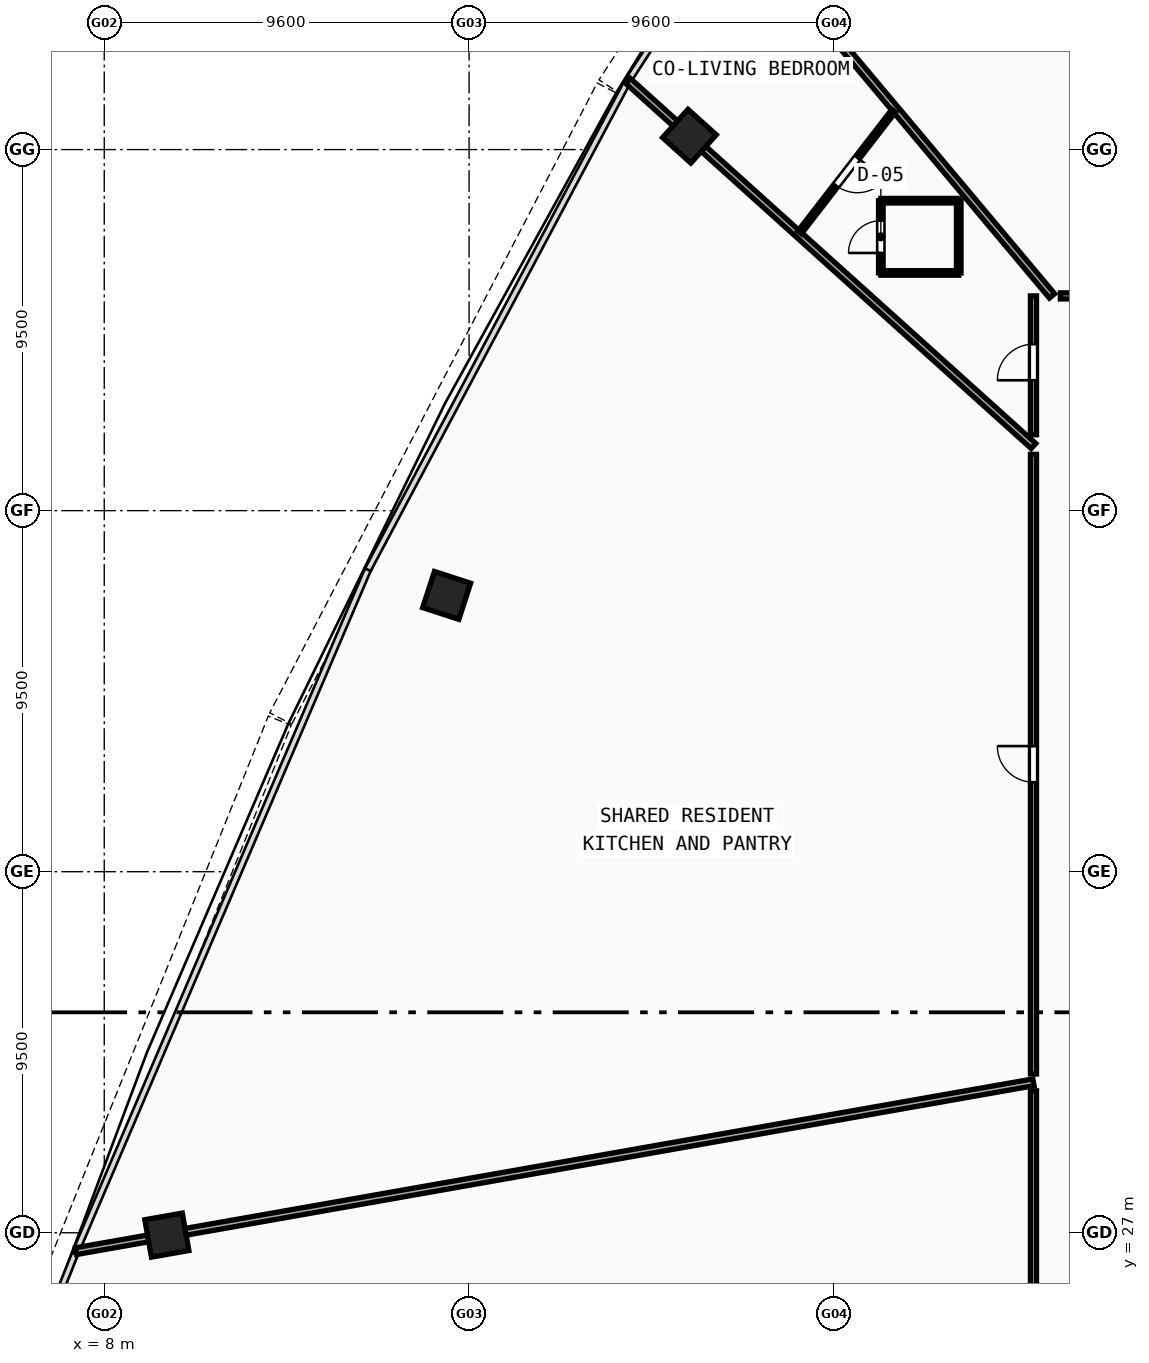
"""IFC4 building model, lengths in metres.
Left out: names, types, materials, properties, quantities, classifications, styles, units other than length and angle.
Written with IfcOpenShell. Run it as: python <this file> out.ifc"""

import sys

from ifc_helpers import new_model, si_unit, direction, frame, frame_2d, origin, origin_with_axes, origin_2d, place, context, subcontext, project, spatial, rectangle, hollow_rectangle, extrude, source, transform, mapped, element, fill, save


model = new_model("IFC4")
c1 = context("Model", 3, precision=1e-05, world=origin(), true_north=direction((0.0, 1.0)))
c2 = subcontext(c1, "Body", "Model", "MODEL_VIEW")
j1 = project(units=[si_unit("LENGTHUNIT", "METRE"), si_unit("PLANEANGLEUNIT", "RADIAN")], contexts=[c1])
p1 = place(None, origin())
s1 = spatial("IfcSite", under=j1, at=p1, CompositionType="ELEMENT")
p2 = place(p1, origin())
s2 = spatial("IfcBuilding", under=s1, at=p2, CompositionType="ELEMENT")
p3 = place(p2, frame((0.0, 0.0, 81.18)))
s3 = spatial("IfcBuildingStorey", under=s2, at=p3, CompositionType="ELEMENT", Elevation=81.18)
m1 = source(origin(), c2, "Body", "SweptSolid", [
    extrude(hollow_rectangle(XDim=1.0, YDim=1.0, WallThickness=0.042, at=origin_2d()), origin(), (0.0, 0.0, 1.0), 3.8),
])
for number, where, z_axis, x_axis in (
    (1, (23.397, 55.852, -0.26), (0.0, 0.0, 1.0), (-0.669, -0.743, 0.0)),
    (2, (17.009, 43.77, -0.26), (0.0, 0.0, 1.0), (-0.309, -0.951, 0.0)),
    (3, (9.647, 26.938, -0.26), (0.0, 0.0, 1.0), (0.174, -0.985, 0.0)),
):
    element("IfcColumn", number, at=place(p3, frame(where, z_axis=z_axis, x_axis=x_axis)), inside=s3, PredefinedType="COLUMN", context=c2, shape_type="MappedRepresentation", body=[
        mapped(m1, transform((0.0, 0.0, 0.0), scale=1.0)),
    ])
p4 = place(p3, frame((40.008, 51.65, 0.0), z_axis=(0.0, 0.0, 1.0), x_axis=(-0.406733854264, 0.913546699296, 0.0)))
e4 = element("IfcWall", 4, at=p4, inside=s3, PredefinedType="PARTITIONING", context=c2, shape_type="SweptSolid", body=[
    extrude(rectangle(XDim=21.911, YDim=0.18, at=frame_2d((10.956, 0.0))), origin(), (0.0, 0.0, 1.0), 2.84),
])
p5 = place(p3, frame((32.938, 51.65, 0.0), z_axis=(0.0, 0.0, 1.0), x_axis=(-0.642792408097, 0.766040416749, 0.0)))
e5 = element("IfcWall", 5, at=p5, inside=s3, PredefinedType="PARTITIONING", context=c2, shape_type="SweptSolid", body=[
    extrude(rectangle(XDim=13.01, YDim=0.18, at=frame_2d((6.505, 0.0))), origin(), (0.0, 0.0, 1.0), 2.84),
])
p6 = place(p3, frame((32.45, 47.701, 0.0), z_axis=(0.0, 0.0, 1.0), x_axis=(-0.743147852162, 0.66912724487, 0.0)))
e6 = element("IfcWall", 6, at=p6, inside=s3, PredefinedType="PARTITIONING", context=c2, shape_type="SweptSolid", body=[
    extrude(rectangle(XDim=14.357, YDim=0.18, at=frame_2d((7.179, 0.0))), origin(), (0.0, 0.0, 1.0), 2.84),
])
p7 = place(p3, frame((32.45, 30.958, 0.0), z_axis=(0.0, 0.0, 1.0), x_axis=(-0.984808048641, -0.173646501066, 0.0)))
e7 = element("IfcWall", 7, at=p7, inside=s3, PredefinedType="PARTITIONING", context=c2, shape_type="SweptSolid", body=[
    extrude(rectangle(XDim=25.582, YDim=0.18, at=frame_2d((12.791, 0.0))), origin(), (0.0, 0.0, 1.0), 2.84),
])
p8 = place(p3, frame((32.45, 24.8, 0.0), z_axis=(0.0, 0.0, 1.0), x_axis=(0.0, 1.0, 0.0)))
e8 = element("IfcWall", 8, at=p8, inside=s3, PredefinedType="PARTITIONING", context=c2, shape_type="SweptSolid", body=[
    extrude(rectangle(XDim=5.935, YDim=0.16, at=frame_2d((2.967, 0.0))), origin(), (0.0, 0.0, 1.0), 3.14),
])
p9 = place(p3, frame((32.45, 31.178, 0.0), z_axis=(0.0, 0.0, 1.0), x_axis=(0.0, 1.0, 0.0)))
e9 = element("IfcWall", 9, at=p9, inside=s3, PredefinedType="PARTITIONING", context=c2, shape_type="SweptSolid", body=[
    extrude(rectangle(XDim=16.304, YDim=0.16, at=frame_2d((8.152, 0.0))), origin(), (0.0, 0.0, 1.0), 2.84),
])
p10 = place(p9, frame((7.677, 0.0, 0.0)))
e10 = element("IfcOpeningElement", 10, at=p10, cuts=e9, PredefinedType="OPENING", context=c2, shape_type="SweptSolid", body=[
    extrude(rectangle(XDim=0.95, YDim=2.1, at=frame_2d((0.475, 1.05))), frame((0.0, 0.09, 0.0), z_axis=(0.0, -1.0, 0.0), x_axis=(1.0, 0.0, 0.0)), (0.0, 0.0, 1.0), 0.18),
])
p11 = place(p3, frame((32.45, 47.997, 0.0), z_axis=(0.0, 0.0, 1.0), x_axis=(0.0, 1.0, 0.0)))
e11 = element("IfcWall", 11, at=p11, inside=s3, PredefinedType="PARTITIONING", context=c2, shape_type="SweptSolid", body=[
    extrude(rectangle(XDim=3.653, YDim=0.16, at=frame_2d((1.826, 0.0))), origin(), (0.0, 0.0, 1.0), 3.54),
])
p12 = place(p11, frame((1.433, 0.0, 0.0)))
e12 = element("IfcOpeningElement", 12, at=p12, cuts=e11, PredefinedType="OPENING", context=c2, shape_type="SweptSolid", body=[
    extrude(rectangle(XDim=0.95, YDim=2.1, at=frame_2d((0.475, 1.05))), frame((0.0, 0.09, 0.0), z_axis=(0.0, -1.0, 0.0), x_axis=(1.0, 0.0, 0.0)), (0.0, 0.0, 1.0), 0.18),
])
p13 = place(p3, frame((33.158, 51.65, 0.0), z_axis=(0.0, 0.0, 1.0), x_axis=(1.0, 0.0, 0.0)))
e13 = element("IfcWall", 13, at=p13, inside=s3, PredefinedType="PARTITIONING", context=c2, shape_type="SweptSolid", body=[
    extrude(rectangle(XDim=6.609, YDim=0.16, at=frame_2d((3.305, 0.0))), origin(), (0.0, 0.0, 1.0), 3.54),
])
p14 = place(p13, frame((2.84, 0.0, 0.0)))
e14 = element("IfcOpeningElement", 14, at=p14, cuts=e13, PredefinedType="OPENING", context=c2, shape_type="SweptSolid", body=[
    extrude(rectangle(XDim=0.95, YDim=2.1, at=frame_2d((0.475, 1.05))), frame((0.0, 0.09, 0.0), z_axis=(0.0, -1.0, 0.0), x_axis=(1.0, 0.0, 0.0)), (0.0, 0.0, 1.0), 0.18),
])
p15 = place(p3, frame((28.434, 52.255, 0.0), z_axis=(0.0, 0.0, 1.0), x_axis=(1.0, 0.0, 0.0)))
e15 = element("IfcWall", 15, at=p15, inside=s3, PredefinedType="PARTITIONING", context=c2, shape_type="SweptSolid", body=[
    extrude(rectangle(XDim=2.05, YDim=0.12, at=frame_2d((1.025, 0.0))), origin(), (0.0, 0.0, 1.0), 3.14),
])
p16 = place(p3, frame((30.484, 52.255, 0.0), z_axis=(0.0, 0.0, 1.0), x_axis=(0.0, 1.0, 0.0)))
e16 = element("IfcWall", 16, at=p16, inside=s3, PredefinedType="PARTITIONING", context=c2, shape_type="SweptSolid", body=[
    extrude(rectangle(XDim=1.9, YDim=0.12, at=frame_2d((0.95, 0.0))), origin(), (0.0, 0.0, 1.0), 3.14),
])
p17 = place(p3, frame((30.484, 54.155, 0.0), z_axis=(0.0, 0.0, 1.0), x_axis=(-1.0, 0.0, 0.0)))
e17 = element("IfcWall", 17, at=p17, inside=s3, PredefinedType="PARTITIONING", context=c2, shape_type="SweptSolid", body=[
    extrude(rectangle(XDim=2.05, YDim=0.12, at=frame_2d((1.025, 0.0))), origin(), (0.0, 0.0, 1.0), 3.54),
])
p18 = place(p3, frame((28.434, 54.155, 0.0), z_axis=(0.0, 0.0, 1.0), x_axis=(0.0, -1.0, 0.0)))
e18 = element("IfcWall", 18, at=p18, inside=s3, PredefinedType="PARTITIONING", context=c2, shape_type="SweptSolid", body=[
    extrude(rectangle(XDim=1.9, YDim=0.12, at=frame_2d((0.95, 0.0))), origin(), (0.0, 0.0, 1.0), 3.54),
])
p19 = place(p18, frame((0.525, 0.0, 0.0)))
e19 = element("IfcOpeningElement", 19, at=p19, cuts=e18, PredefinedType="OPENING", context=c2, shape_type="SweptSolid", body=[
    extrude(rectangle(XDim=0.85, YDim=2.1, at=frame_2d((0.425, 1.05))), frame((0.0, 0.07, 0.0), z_axis=(0.0, -1.0, 0.0), x_axis=(1.0, 0.0, 0.0)), (0.0, 0.0, 1.0), 0.14),
])
p20 = place(p3, frame((28.772, 56.521, 0.0), z_axis=(0.0, 0.0, 1.0), x_axis=(-0.611610665825, -0.791158892669, 0.0)))
e20 = element("IfcWall", 20, at=p20, inside=s3, PredefinedType="PARTITIONING", context=c2, shape_type="SweptSolid", body=[
    extrude(rectangle(XDim=4.045, YDim=0.12, at=frame_2d((2.022, 0.0))), origin(), (0.0, 0.0, 1.0), 2.84),
])
p21 = place(p20, frame((1.562, 0.0, 0.0)))
e21 = element("IfcOpeningElement", 21, at=p21, cuts=e20, PredefinedType="OPENING", context=c2, shape_type="SweptSolid", body=[
    extrude(rectangle(XDim=0.92, YDim=2.1, at=frame_2d((0.46, 1.05))), frame((0.0, 0.07, 0.0), z_axis=(0.0, -1.0, 0.0), x_axis=(1.0, 0.0, 0.0)), (0.0, 0.0, 1.0), 0.14),
])
m2 = source(origin(), c2, "Body", "SweptSolid", [
    extrude(rectangle(XDim=0.95, YDim=2.1, at=frame_2d((0.475, 1.05))), frame((0.0, 0.025, 0.0), z_axis=(0.0, -1.0, 0.0), x_axis=(1.0, 0.0, 0.0)), (0.0, 0.0, 1.0), 0.05),
])
p22 = place(p12, origin_with_axes())
e22 = element("IfcDoor", 22, at=p22, inside=s3, OperationType="SINGLE_SWING_LEFT", PredefinedType="DOOR", context=c2, shape_type="MappedRepresentation", body=[
    mapped(m2, transform((0.0, 0.0, 0.0), scale=1.0)),
])
fill(e12, e22)
m3 = source(origin(), c2, "Body", "SweptSolid", [
    extrude(rectangle(XDim=0.85, YDim=2.1, at=frame_2d((0.425, 1.05))), frame((0.0, 0.025, 0.0), z_axis=(0.0, -1.0, 0.0), x_axis=(1.0, 0.0, 0.0)), (0.0, 0.0, 1.0), 0.05),
])
p23 = place(p19, frame((0.85, 0.0, 0.0), z_axis=(0.0, 0.0, 1.0), x_axis=(-1.0, 0.0, 0.0)))
e23 = element("IfcDoor", 23, at=p23, inside=s3, OperationType="SINGLE_SWING_LEFT", PredefinedType="DOOR", context=c2, shape_type="MappedRepresentation", body=[
    mapped(m3, transform((0.0, 0.0, 0.0), scale=1.0)),
])
fill(e19, e23)
m4 = source(origin(), c2, "Body", "SweptSolid", [
    extrude(rectangle(XDim=0.92, YDim=2.1, at=frame_2d((0.46, 1.05))), frame((0.0, 0.025, 0.0), z_axis=(0.0, -1.0, 0.0), x_axis=(1.0, 0.0, 0.0)), (0.0, 0.0, 1.0), 0.05),
])
p24 = place(p21, origin_with_axes())
e24 = element("IfcDoor", 24, at=p24, inside=s3, OperationType="SINGLE_SWING_LEFT", PredefinedType="DOOR", context=c2, shape_type="MappedRepresentation", body=[
    mapped(m4, transform((0.0, 0.0, 0.0), scale=1.0)),
])
fill(e21, e24)
p25 = place(p10, origin_with_axes())
e25 = element("IfcDoor", 25, at=p25, inside=s3, OperationType="SINGLE_SWING_RIGHT", PredefinedType="DOOR", context=c2, shape_type="MappedRepresentation", body=[
    mapped(m2, transform((0.0, 0.0, 0.0), scale=1.0)),
])
fill(e10, e25)
save(model, sys.argv[1])
